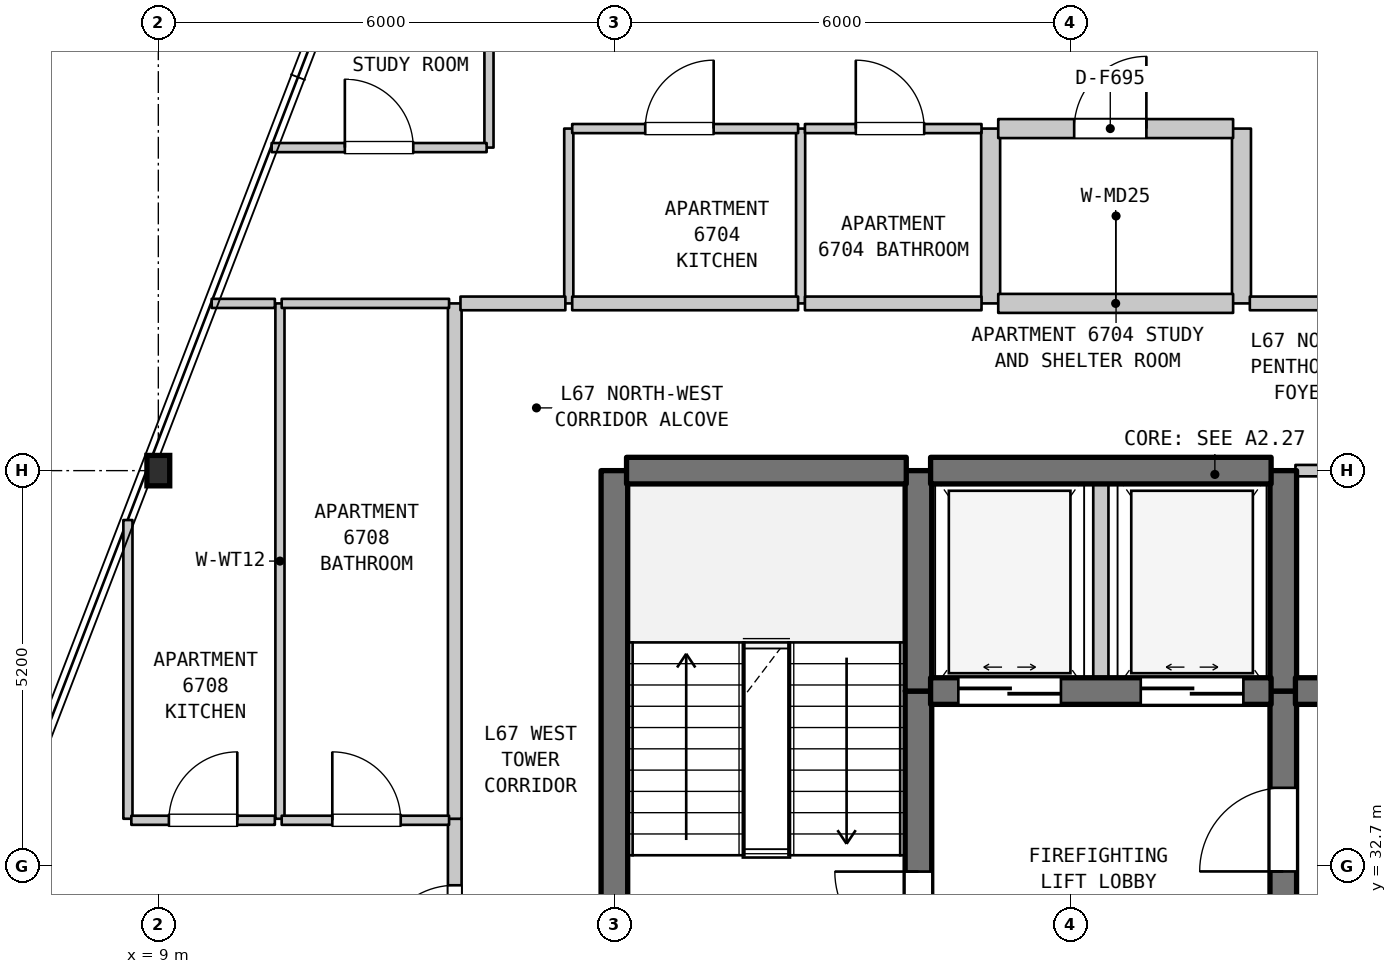
"""IFC4 building model, lengths in metres.
Left out: names, types, materials, properties, quantities, classifications, styles, units other than length and angle.
Written with IfcOpenShell. Run it as: python <this file> out.ifc"""

import sys

from ifc_helpers import new_model, si_unit, direction, frame, frame_2d, origin, origin_2d, place, context, subcontext, project, spatial, rectangle, i_section, extrude, element, fill, save


model = new_model("IFC4")
c1 = context("Model", 3, precision=1e-05, world=origin(), true_north=direction((0.0, 1.0)))
c2 = subcontext(c1, "Body", "Model", "MODEL_VIEW")
j1 = project(units=[si_unit("LENGTHUNIT", "METRE"), si_unit("PLANEANGLEUNIT", "RADIAN")], contexts=[c1])
p1 = place(None, origin())
s1 = spatial("IfcSite", under=j1, at=p1, CompositionType="ELEMENT")
p2 = place(p1, origin())
s2 = spatial("IfcBuilding", under=s1, at=p2, CompositionType="ELEMENT")
p3 = place(p2, frame((0.0, 0.0, 269.5)))
s3 = spatial("IfcBuildingStorey", under=s2, at=p3, CompositionType="ELEMENT", Elevation=269.5)
p4 = place(p3, frame((9.0, 37.9, 0.0), z_axis=(0.0, 0.0, 1.0), x_axis=(1.0, 0.0, 0.0)))
e1 = element("IfcColumn", 1, at=p4, inside=s3, PredefinedType="COLUMN", context=c2, shape_type="SweptSolid", body=[
    extrude(i_section(OverallWidth=0.3, OverallDepth=0.4, WebThickness=0.013, FlangeThickness=0.024, FilletRadius=0.027, at=origin_2d()), origin(), (0.0, 0.0, 1.0), 3.7),
])
p5 = place(p3, frame((8.6, 33.32, 0.0), z_axis=(0.0, 0.0, 1.0), x_axis=(0.0, 1.0, 0.0)))
e2 = element("IfcWall", 2, at=p5, inside=s3, PredefinedType="PARTITIONING", context=c2, shape_type="SweptSolid", body=[
    extrude(rectangle(XDim=3.93, YDim=0.12, at=frame_2d((1.965, 0.0))), origin(), (0.0, 0.0, 1.0), 3.39),
])
p6 = place(p3, frame((10.6, 33.32, 0.0), z_axis=(0.0, 0.0, 1.0), x_axis=(0.0, 1.0, 0.0)))
e3 = element("IfcWall", 3, at=p6, inside=s3, PredefinedType="PARTITIONING", context=c2, shape_type="SweptSolid", body=[
    extrude(rectangle(XDim=6.78, YDim=0.12, at=frame_2d((3.39, 0.0))), origin(), (0.0, 0.0, 1.0), 3.39),
])
p7 = place(p3, frame((12.9, 30.57, 0.0), z_axis=(0.0, 0.0, 1.0), x_axis=(0.0, 1.0, 0.0)))
e4 = element("IfcWall", 4, at=p7, inside=s3, PredefinedType="STANDARD", context=c2, shape_type="SweptSolid", body=[
    extrude(rectangle(XDim=2.75, YDim=0.18, at=frame_2d((1.375, 0.0))), origin(), (0.0, 0.0, 1.0), 3.39),
])
p8 = place(p7, frame((0.875, 0.0, 0.0)))
e5 = element("IfcOpeningElement", 5, at=p8, cuts=e4, PredefinedType="OPENING", context=c2, shape_type="SweptSolid", body=[
    extrude(rectangle(XDim=1.0, YDim=2.15, at=frame_2d((0.5, 1.075))), frame((0.0, 0.1, 0.0), z_axis=(0.0, -1.0, 0.0), x_axis=(1.0, 0.0, 0.0)), (0.0, 0.0, 1.0), 0.2),
])
p9 = place(p3, frame((12.9, 33.32, 0.0), z_axis=(0.0, 0.0, 1.0), x_axis=(0.0, 1.0, 0.0)))
e6 = element("IfcWall", 6, at=p9, inside=s3, PredefinedType="STANDARD", context=c2, shape_type="SweptSolid", body=[
    extrude(rectangle(XDim=6.78, YDim=0.18, at=frame_2d((3.39, 0.0))), origin(), (0.0, 0.0, 1.0), 3.39),
])
p10 = place(p3, frame((13.35, 42.15, 0.0), z_axis=(0.0, 0.0, 1.0), x_axis=(0.0, 1.0, 0.0)))
e7 = element("IfcWall", 7, at=p10, inside=s3, PredefinedType="PARTITIONING", context=c2, shape_type="SweptSolid", body=[
    extrude(rectangle(XDim=7.45, YDim=0.12, at=frame_2d((3.725, 0.0))), origin(), (0.0, 0.0, 1.0), 3.39),
])
p11 = place(p3, frame((14.4, 40.1, 0.0), z_axis=(0.0, 0.0, 1.0), x_axis=(0.0, 1.0, 0.0)))
e8 = element("IfcWall", 8, at=p11, inside=s3, PredefinedType="PARTITIONING", context=c2, shape_type="SweptSolid", body=[
    extrude(rectangle(XDim=2.3, YDim=0.12, at=frame_2d((1.15, 0.0))), origin(), (0.0, 0.0, 1.0), 3.39),
])
p12 = place(p3, frame((15.0, 31.1, 0.0), z_axis=(0.0, 0.0, 1.0), x_axis=(0.0, 1.0, 0.0)))
e9 = element("IfcWall", 9, at=p12, inside=s3, PredefinedType="SHEAR", context=c2, shape_type="SweptSolid", body=[
    extrude(rectangle(XDim=6.8, YDim=0.35, at=frame_2d((3.4, 0.0))), origin(), (0.0, 0.0, 1.0), 3.39),
])
p13 = place(p3, frame((17.45, 40.1, 0.0), z_axis=(0.0, 0.0, 1.0), x_axis=(0.0, 1.0, 0.0)))
e10 = element("IfcWall", 10, at=p13, inside=s3, PredefinedType="PARTITIONING", context=c2, shape_type="SweptSolid", body=[
    extrude(rectangle(XDim=2.3, YDim=0.12, at=frame_2d((1.15, 0.0))), origin(), (0.0, 0.0, 1.0), 3.39),
])
p14 = place(p3, frame((19.0, 29.5, 0.0), z_axis=(0.0, 0.0, 1.0), x_axis=(0.0, 1.0, 0.0)))
e11 = element("IfcWall", 11, at=p14, inside=s3, PredefinedType="SHEAR", context=c2, shape_type="SweptSolid", body=[
    extrude(rectangle(XDim=5.5, YDim=0.35, at=frame_2d((2.75, 0.0))), origin(), (0.0, 0.0, 1.0), 3.39),
])
p15 = place(p14, frame((2.025, 0.0, 0.0)))
e12 = element("IfcOpeningElement", 12, at=p15, cuts=e11, PredefinedType="OPENING", context=c2, shape_type="SweptSolid", body=[
    extrude(rectangle(XDim=1.1, YDim=2.15, at=frame_2d((0.55, 1.075))), frame((0.0, 0.185, 0.0), z_axis=(0.0, -1.0, 0.0), x_axis=(1.0, 0.0, 0.0)), (0.0, 0.0, 1.0), 0.37),
])
p16 = place(p3, frame((19.0, 35.0, 0.0), z_axis=(0.0, 0.0, 1.0), x_axis=(0.0, 1.0, 0.0)))
e13 = element("IfcWall", 13, at=p16, inside=s3, PredefinedType="SHEAR", context=c2, shape_type="SweptSolid", body=[
    extrude(rectangle(XDim=2.9, YDim=0.35, at=frame_2d((1.45, 0.0))), origin(), (0.0, 0.0, 1.0), 3.39),
])
p17 = place(p3, frame((19.95, 40.1, 0.0), z_axis=(0.0, 0.0, 1.0), x_axis=(0.0, 1.0, 0.0)))
e14 = element("IfcWall", 14, at=p17, inside=s3, PredefinedType="STANDARD", context=c2, shape_type="SweptSolid", body=[
    extrude(rectangle(XDim=2.3, YDim=0.25, at=frame_2d((1.15, 0.0))), origin(), (0.0, 0.0, 1.0), 3.39),
])
p18 = place(p3, frame((21.4, 35.0, 0.0), z_axis=(0.0, 0.0, 1.0), x_axis=(0.0, 1.0, 0.0)))
e15 = element("IfcWall", 15, at=p18, inside=s3, PredefinedType="STANDARD", context=c2, shape_type="SweptSolid", body=[
    extrude(rectangle(XDim=2.9, YDim=0.2, at=frame_2d((1.45, 0.0))), origin(), (0.0, 0.0, 1.0), 3.39),
])
p19 = place(p3, frame((23.25, 40.1, 0.0), z_axis=(0.0, 0.0, 1.0), x_axis=(0.0, 1.0, 0.0)))
e16 = element("IfcWall", 16, at=p19, inside=s3, PredefinedType="STANDARD", context=c2, shape_type="SweptSolid", body=[
    extrude(rectangle(XDim=2.3, YDim=0.25, at=frame_2d((1.15, 0.0))), origin(), (0.0, 0.0, 1.0), 3.39),
])
p20 = place(p3, frame((23.8, 31.5, 0.0), z_axis=(0.0, 0.0, 1.0), x_axis=(0.0, 1.0, 0.0)))
e17 = element("IfcWall", 17, at=p20, inside=s3, PredefinedType="SHEAR", context=c2, shape_type="SweptSolid", body=[
    extrude(rectangle(XDim=3.5, YDim=0.35, at=frame_2d((1.75, 0.0))), origin(), (0.0, 0.0, 1.0), 3.39),
])
p21 = place(p20, frame((1.127, 0.0, 0.0)))
e18 = element("IfcOpeningElement", 18, at=p21, cuts=e17, PredefinedType="OPENING", context=c2, shape_type="SweptSolid", body=[
    extrude(rectangle(XDim=1.1, YDim=2.15, at=frame_2d((0.55, 1.075))), frame((0.0, 0.185, 0.0), z_axis=(0.0, -1.0, 0.0), x_axis=(1.0, 0.0, 0.0)), (0.0, 0.0, 1.0), 0.37),
])
p22 = place(p3, frame((23.8, 35.0, 0.0), z_axis=(0.0, 0.0, 1.0), x_axis=(0.0, 1.0, 0.0)))
e19 = element("IfcWall", 19, at=p22, inside=s3, PredefinedType="SHEAR", context=c2, shape_type="SweptSolid", body=[
    extrude(rectangle(XDim=2.9, YDim=0.35, at=frame_2d((1.45, 0.0))), origin(), (0.0, 0.0, 1.0), 3.39),
])
p23 = place(p3, frame((8.645, 33.3, 0.0), z_axis=(0.0, 0.0, 1.0), x_axis=(1.0, 0.0, 0.0)))
e20 = element("IfcWall", 20, at=p23, inside=s3, PredefinedType="PARTITIONING", context=c2, shape_type="SweptSolid", body=[
    extrude(rectangle(XDim=1.888, YDim=0.12, at=frame_2d((0.944, 0.0))), origin(), (0.0, 0.0, 1.0), 3.39),
])
p24 = place(p23, frame((0.494, 0.0, 0.0)))
e21 = element("IfcOpeningElement", 21, at=p24, cuts=e20, PredefinedType="OPENING", context=c2, shape_type="SweptSolid", body=[
    extrude(rectangle(XDim=0.9, YDim=2.15, at=frame_2d((0.45, 1.075))), frame((0.0, 0.07, 0.0), z_axis=(0.0, -1.0, 0.0), x_axis=(1.0, 0.0, 0.0)), (0.0, 0.0, 1.0), 0.14),
])
p25 = place(p3, frame((10.623, 33.3, 0.0), z_axis=(0.0, 0.0, 1.0), x_axis=(1.0, 0.0, 0.0)))
e22 = element("IfcWall", 22, at=p25, inside=s3, PredefinedType="PARTITIONING", context=c2, shape_type="SweptSolid", body=[
    extrude(rectangle(XDim=2.202, YDim=0.12, at=frame_2d((1.101, 0.0))), origin(), (0.0, 0.0, 1.0), 3.39),
])
p26 = place(p25, frame((0.666, 0.0, 0.0)))
e23 = element("IfcOpeningElement", 23, at=p26, cuts=e22, PredefinedType="OPENING", context=c2, shape_type="SweptSolid", body=[
    extrude(rectangle(XDim=0.9, YDim=2.1, at=frame_2d((0.45, 1.05))), frame((0.0, 0.07, 0.0), z_axis=(0.0, -1.0, 0.0), x_axis=(1.0, 0.0, 0.0)), (0.0, 0.0, 1.0), 0.14),
])
p27 = place(p3, frame((19.16, 35.0, 0.0), z_axis=(0.0, 0.0, 1.0), x_axis=(1.0, 0.0, 0.0)))
e24 = element("IfcWall", 24, at=p27, inside=s3, PredefinedType="SHEAR", context=c2, shape_type="SweptSolid", body=[
    extrude(rectangle(XDim=4.48, YDim=0.35, at=frame_2d((2.24, 0.0))), origin(), (0.0, 0.0, 1.0), 3.39),
])
p28 = place(p27, frame((0.365, 0.0, 0.0)))
e25 = element("IfcOpeningElement", 25, at=p28, cuts=e24, PredefinedType="OPENING", context=c2, shape_type="SweptSolid", body=[
    extrude(rectangle(XDim=1.35, YDim=2.2, at=frame_2d((0.675, 1.1))), frame((0.0, 0.185, 0.0), z_axis=(0.0, -1.0, 0.0), x_axis=(1.0, 0.0, 0.0)), (0.0, 0.0, 1.0), 0.37),
])
p29 = place(p27, frame((2.765, 0.0, 0.0)))
e26 = element("IfcOpeningElement", 26, at=p29, cuts=e24, PredefinedType="OPENING", context=c2, shape_type="SweptSolid", body=[
    extrude(rectangle(XDim=1.35, YDim=2.2, at=frame_2d((0.675, 1.1))), frame((0.0, 0.185, 0.0), z_axis=(0.0, -1.0, 0.0), x_axis=(1.0, 0.0, 0.0)), (0.0, 0.0, 1.0), 0.37),
])
p30 = place(p3, frame((23.96, 35.0, 0.0), z_axis=(0.0, 0.0, 1.0), x_axis=(1.0, 0.0, 0.0)))
e27 = element("IfcWall", 27, at=p30, inside=s3, PredefinedType="SHEAR", context=c2, shape_type="SweptSolid", body=[
    extrude(rectangle(XDim=2.595, YDim=0.35, at=frame_2d((1.297, 0.0))), origin(), (0.0, 0.0, 1.0), 3.39),
])
p31 = place(p30, frame((0.691, 0.0, 0.0)))
e28 = element("IfcOpeningElement", 28, at=p31, cuts=e27, PredefinedType="OPENING", context=c2, shape_type="SweptSolid", body=[
    extrude(rectangle(XDim=0.95, YDim=2.15, at=frame_2d((0.475, 1.075))), frame((0.0, 0.185, 0.0), z_axis=(0.0, -1.0, 0.0), x_axis=(1.0, 0.0, 0.0)), (0.0, 0.0, 1.0), 0.37),
])
p32 = place(p3, frame((15.16, 37.9, 0.0), z_axis=(0.0, 0.0, 1.0), x_axis=(1.0, 0.0, 0.0)))
e29 = element("IfcWall", 29, at=p32, inside=s3, PredefinedType="SHEAR", context=c2, shape_type="SweptSolid", body=[
    extrude(rectangle(XDim=3.68, YDim=0.35, at=frame_2d((1.84, 0.0))), origin(), (0.0, 0.0, 1.0), 3.39),
])
p33 = place(p3, frame((19.16, 37.9, 0.0), z_axis=(0.0, 0.0, 1.0), x_axis=(1.0, 0.0, 0.0)))
e30 = element("IfcWall", 30, at=p33, inside=s3, PredefinedType="SHEAR", context=c2, shape_type="SweptSolid", body=[
    extrude(rectangle(XDim=4.48, YDim=0.35, at=frame_2d((2.24, 0.0))), origin(), (0.0, 0.0, 1.0), 3.39),
])
p34 = place(p3, frame((23.96, 37.9, 0.0), z_axis=(0.0, 0.0, 1.0), x_axis=(1.0, 0.0, 0.0)))
e31 = element("IfcWall", 31, at=p34, inside=s3, PredefinedType="STANDARD", context=c2, shape_type="SweptSolid", body=[
    extrude(rectangle(XDim=2.595, YDim=0.15, at=frame_2d((1.297, 0.0))), origin(), (0.0, 0.0, 1.0), 2.89),
])
p35 = place(p3, frame((9.702, 40.1, 0.0), z_axis=(0.0, 0.0, 1.0), x_axis=(1.0, 0.0, 0.0)))
e32 = element("IfcWall", 32, at=p35, inside=s3, PredefinedType="PARTITIONING", context=c2, shape_type="SweptSolid", body=[
    extrude(rectangle(XDim=0.831, YDim=0.12, at=frame_2d((0.416, 0.0))), origin(), (0.0, 0.0, 1.0), 3.39),
])
p36 = place(p3, frame((10.623, 40.1, 0.0), z_axis=(0.0, 0.0, 1.0), x_axis=(1.0, 0.0, 0.0)))
e33 = element("IfcWall", 33, at=p36, inside=s3, PredefinedType="PARTITIONING", context=c2, shape_type="SweptSolid", body=[
    extrude(rectangle(XDim=2.202, YDim=0.12, at=frame_2d((1.101, 0.0))), origin(), (0.0, 0.0, 1.0), 3.39),
])
p37 = place(p3, frame((12.975, 40.1, 0.0), z_axis=(0.0, 0.0, 1.0), x_axis=(1.0, 0.0, 0.0)))
e34 = element("IfcWall", 34, at=p37, inside=s3, PredefinedType="STANDARD", context=c2, shape_type="SweptSolid", body=[
    extrude(rectangle(XDim=1.38, YDim=0.18, at=frame_2d((0.69, 0.0))), origin(), (0.0, 0.0, 1.0), 3.39),
])
p38 = place(p3, frame((14.445, 40.1, 0.0), z_axis=(0.0, 0.0, 1.0), x_axis=(1.0, 0.0, 0.0)))
e35 = element("IfcWall", 35, at=p38, inside=s3, PredefinedType="STANDARD", context=c2, shape_type="SweptSolid", body=[
    extrude(rectangle(XDim=2.972, YDim=0.18, at=frame_2d((1.486, 0.0))), origin(), (0.0, 0.0, 1.0), 3.39),
])
p39 = place(p3, frame((17.507, 40.1, 0.0), z_axis=(0.0, 0.0, 1.0), x_axis=(1.0, 0.0, 0.0)))
e36 = element("IfcWall", 36, at=p39, inside=s3, PredefinedType="STANDARD", context=c2, shape_type="SweptSolid", body=[
    extrude(rectangle(XDim=2.323, YDim=0.18, at=frame_2d((1.162, 0.0))), origin(), (0.0, 0.0, 1.0), 3.39),
])
p40 = place(p3, frame((20.05, 40.1, 0.0), z_axis=(0.0, 0.0, 1.0), x_axis=(1.0, 0.0, 0.0)))
e37 = element("IfcWall", 37, at=p40, inside=s3, PredefinedType="STANDARD", context=c2, shape_type="SweptSolid", body=[
    extrude(rectangle(XDim=3.09, YDim=0.25, at=frame_2d((1.545, 0.0))), origin(), (0.0, 0.0, 1.0), 3.39),
])
p41 = place(p3, frame((23.36, 40.1, 0.0), z_axis=(0.0, 0.0, 1.0), x_axis=(1.0, 0.0, 0.0)))
e38 = element("IfcWall", 38, at=p41, inside=s3, PredefinedType="STANDARD", context=c2, shape_type="SweptSolid", body=[
    extrude(rectangle(XDim=9.565, YDim=0.18, at=frame_2d((4.782, 0.0))), origin(), (0.0, 0.0, 1.0), 3.39),
])
p42 = place(p41, frame((1.97, 0.0, 0.0)))
e39 = element("IfcOpeningElement", 39, at=p42, cuts=e38, PredefinedType="OPENING", context=c2, shape_type="SweptSolid", body=[
    extrude(rectangle(XDim=1.0, YDim=2.15, at=frame_2d((0.5, 1.075))), frame((0.0, 0.1, 0.0), z_axis=(0.0, -1.0, 0.0), x_axis=(1.0, 0.0, 0.0)), (0.0, 0.0, 1.0), 0.2),
])
p43 = place(p41, frame((6.793, 0.0, 0.0)))
e40 = element("IfcOpeningElement", 40, at=p43, cuts=e38, PredefinedType="OPENING", context=c2, shape_type="SweptSolid", body=[
    extrude(rectangle(XDim=1.0, YDim=2.15, at=frame_2d((0.5, 1.075))), frame((0.0, 0.1, 0.0), z_axis=(0.0, -1.0, 0.0), x_axis=(1.0, 0.0, 0.0)), (0.0, 0.0, 1.0), 0.2),
])
p44 = place(p3, frame((10.491, 42.15, 0.0), z_axis=(0.0, 0.0, 1.0), x_axis=(1.0, 0.0, 0.0)))
e41 = element("IfcWall", 41, at=p44, inside=s3, PredefinedType="PARTITIONING", context=c2, shape_type="SweptSolid", body=[
    extrude(rectangle(XDim=2.828, YDim=0.12, at=frame_2d((1.414, 0.0))), origin(), (0.0, 0.0, 1.0), 3.39),
])
p45 = place(p44, frame((0.963, 0.0, 0.0)))
e42 = element("IfcOpeningElement", 42, at=p45, cuts=e41, PredefinedType="OPENING", context=c2, shape_type="SweptSolid", body=[
    extrude(rectangle(XDim=0.9, YDim=2.15, at=frame_2d((0.45, 1.075))), frame((0.0, 0.07, 0.0), z_axis=(0.0, -1.0, 0.0), x_axis=(1.0, 0.0, 0.0)), (0.0, 0.0, 1.0), 0.14),
])
p46 = place(p3, frame((14.445, 42.4, 0.0), z_axis=(0.0, 0.0, 1.0), x_axis=(1.0, 0.0, 0.0)))
e43 = element("IfcWall", 43, at=p46, inside=s3, PredefinedType="PARTITIONING", context=c2, shape_type="SweptSolid", body=[
    extrude(rectangle(XDim=2.972, YDim=0.12, at=frame_2d((1.486, 0.0))), origin(), (0.0, 0.0, 1.0), 3.39),
])
p47 = place(p46, frame((0.961, 0.0, 0.0)))
e44 = element("IfcOpeningElement", 44, at=p47, cuts=e43, PredefinedType="OPENING", context=c2, shape_type="SweptSolid", body=[
    extrude(rectangle(XDim=0.9, YDim=2.15, at=frame_2d((0.45, 1.075))), frame((0.0, 0.07, 0.0), z_axis=(0.0, -1.0, 0.0), x_axis=(1.0, 0.0, 0.0)), (0.0, 0.0, 1.0), 0.14),
])
p48 = place(p3, frame((17.507, 42.4, 0.0), z_axis=(0.0, 0.0, 1.0), x_axis=(1.0, 0.0, 0.0)))
e45 = element("IfcWall", 45, at=p48, inside=s3, PredefinedType="PARTITIONING", context=c2, shape_type="SweptSolid", body=[
    extrude(rectangle(XDim=2.323, YDim=0.12, at=frame_2d((1.162, 0.0))), origin(), (0.0, 0.0, 1.0), 3.39),
])
p49 = place(p48, frame((0.669, 0.0, 0.0)))
e46 = element("IfcOpeningElement", 46, at=p49, cuts=e45, PredefinedType="OPENING", context=c2, shape_type="SweptSolid", body=[
    extrude(rectangle(XDim=0.9, YDim=2.1, at=frame_2d((0.45, 1.05))), frame((0.0, 0.07, 0.0), z_axis=(0.0, -1.0, 0.0), x_axis=(1.0, 0.0, 0.0)), (0.0, 0.0, 1.0), 0.14),
])
p50 = place(p3, frame((20.05, 42.4, 0.0), z_axis=(0.0, 0.0, 1.0), x_axis=(1.0, 0.0, 0.0)))
e47 = element("IfcWall", 47, at=p50, inside=s3, PredefinedType="STANDARD", context=c2, shape_type="SweptSolid", body=[
    extrude(rectangle(XDim=3.09, YDim=0.25, at=frame_2d((1.545, 0.0))), origin(), (0.0, 0.0, 1.0), 3.39),
])
p51 = place(p50, frame((0.999, 0.0, 0.0)))
e48 = element("IfcOpeningElement", 48, at=p51, cuts=e47, PredefinedType="OPENING", context=c2, shape_type="SweptSolid", body=[
    extrude(rectangle(XDim=0.95, YDim=2.15, at=frame_2d((0.475, 1.075))), frame((0.0, 0.135, 0.0), z_axis=(0.0, -1.0, 0.0), x_axis=(1.0, 0.0, 0.0)), (0.0, 0.0, 1.0), 0.27),
])
p52 = place(p8, origin())
e49 = element("IfcDoor", 49, at=p52, inside=s3, OperationType="SINGLE_SWING_LEFT", PredefinedType="DOOR", context=c2, shape_type="SweptSolid", body=[
    extrude(rectangle(XDim=1.0, YDim=2.15, at=frame_2d((0.5, 1.075))), frame((0.0, 0.025, 0.0), z_axis=(0.0, -1.0, 0.0), x_axis=(1.0, 0.0, 0.0)), (0.0, 0.0, 1.0), 0.05),
])
fill(e5, e49)
p53 = place(p15, origin())
e50 = element("IfcDoor", 50, at=p53, inside=s3, OperationType="SINGLE_SWING_RIGHT", PredefinedType="DOOR", context=c2, shape_type="SweptSolid", body=[
    extrude(rectangle(XDim=1.1, YDim=2.15, at=frame_2d((0.55, 1.075))), frame((0.0, 0.025, 0.0), z_axis=(0.0, -1.0, 0.0), x_axis=(1.0, 0.0, 0.0)), (0.0, 0.0, 1.0), 0.05),
])
fill(e12, e50)
p54 = place(p21, origin())
e51 = element("IfcDoor", 51, at=p54, inside=s3, OperationType="SINGLE_SWING_LEFT", PredefinedType="DOOR", context=c2, shape_type="SweptSolid", body=[
    extrude(rectangle(XDim=1.1, YDim=2.15, at=frame_2d((0.55, 1.075))), frame((0.0, 0.025, 0.0), z_axis=(0.0, -1.0, 0.0), x_axis=(1.0, 0.0, 0.0)), (0.0, 0.0, 1.0), 0.05),
])
fill(e18, e51)
p55 = place(p24, origin())
e52 = element("IfcDoor", 52, at=p55, inside=s3, OperationType="SINGLE_SWING_RIGHT", PredefinedType="DOOR", context=c2, shape_type="SweptSolid", body=[
    extrude(rectangle(XDim=0.9, YDim=2.15, at=frame_2d((0.45, 1.075))), frame((0.0, 0.025, 0.0), z_axis=(0.0, -1.0, 0.0), x_axis=(1.0, 0.0, 0.0)), (0.0, 0.0, 1.0), 0.05),
])
fill(e21, e52)
p56 = place(p26, origin())
e53 = element("IfcDoor", 53, at=p56, inside=s3, OperationType="SINGLE_SWING_LEFT", PredefinedType="DOOR", context=c2, shape_type="SweptSolid", body=[
    extrude(rectangle(XDim=0.9, YDim=2.1, at=frame_2d((0.45, 1.05))), frame((0.0, 0.025, 0.0), z_axis=(0.0, -1.0, 0.0), x_axis=(1.0, 0.0, 0.0)), (0.0, 0.0, 1.0), 0.05),
])
fill(e23, e53)
p57 = place(p28, origin())
e54 = element("IfcDoor", 54, at=p57, inside=s3, OperationType="DOUBLE_DOOR_SLIDING", PredefinedType="DOOR", context=c2, shape_type="SweptSolid", body=[
    extrude(rectangle(XDim=1.35, YDim=2.2, at=frame_2d((0.675, 1.1))), frame((0.0, 0.025, 0.0), z_axis=(0.0, -1.0, 0.0), x_axis=(1.0, 0.0, 0.0)), (0.0, 0.0, 1.0), 0.05),
])
fill(e25, e54)
p58 = place(p29, origin())
e55 = element("IfcDoor", 55, at=p58, inside=s3, OperationType="DOUBLE_DOOR_SLIDING", PredefinedType="DOOR", context=c2, shape_type="SweptSolid", body=[
    extrude(rectangle(XDim=1.35, YDim=2.2, at=frame_2d((0.675, 1.1))), frame((0.0, 0.025, 0.0), z_axis=(0.0, -1.0, 0.0), x_axis=(1.0, 0.0, 0.0)), (0.0, 0.0, 1.0), 0.05),
])
fill(e26, e55)
p59 = place(p45, origin())
e56 = element("IfcDoor", 56, at=p59, inside=s3, OperationType="SINGLE_SWING_LEFT", PredefinedType="DOOR", context=c2, shape_type="SweptSolid", body=[
    extrude(rectangle(XDim=0.9, YDim=2.15, at=frame_2d((0.45, 1.075))), frame((0.0, 0.025, 0.0), z_axis=(0.0, -1.0, 0.0), x_axis=(1.0, 0.0, 0.0)), (0.0, 0.0, 1.0), 0.05),
])
fill(e42, e56)
p60 = place(p47, origin())
e57 = element("IfcDoor", 57, at=p60, inside=s3, OperationType="SINGLE_SWING_RIGHT", PredefinedType="DOOR", context=c2, shape_type="SweptSolid", body=[
    extrude(rectangle(XDim=0.9, YDim=2.15, at=frame_2d((0.45, 1.075))), frame((0.0, 0.025, 0.0), z_axis=(0.0, -1.0, 0.0), x_axis=(1.0, 0.0, 0.0)), (0.0, 0.0, 1.0), 0.05),
])
fill(e44, e57)
p61 = place(p49, origin())
e58 = element("IfcDoor", 58, at=p61, inside=s3, OperationType="SINGLE_SWING_LEFT", PredefinedType="DOOR", context=c2, shape_type="SweptSolid", body=[
    extrude(rectangle(XDim=0.9, YDim=2.1, at=frame_2d((0.45, 1.05))), frame((0.0, 0.025, 0.0), z_axis=(0.0, -1.0, 0.0), x_axis=(1.0, 0.0, 0.0)), (0.0, 0.0, 1.0), 0.05),
])
fill(e46, e58)
p62 = place(p51, origin())
e59 = element("IfcDoor", 59, at=p62, inside=s3, OperationType="SINGLE_SWING_RIGHT", PredefinedType="DOOR", context=c2, shape_type="SweptSolid", body=[
    extrude(rectangle(XDim=0.95, YDim=2.15, at=frame_2d((0.475, 1.075))), frame((0.0, 0.025, 0.0), z_axis=(0.0, -1.0, 0.0), x_axis=(1.0, 0.0, 0.0)), (0.0, 0.0, 1.0), 0.05),
])
fill(e48, e59)
save(model, sys.argv[1])
